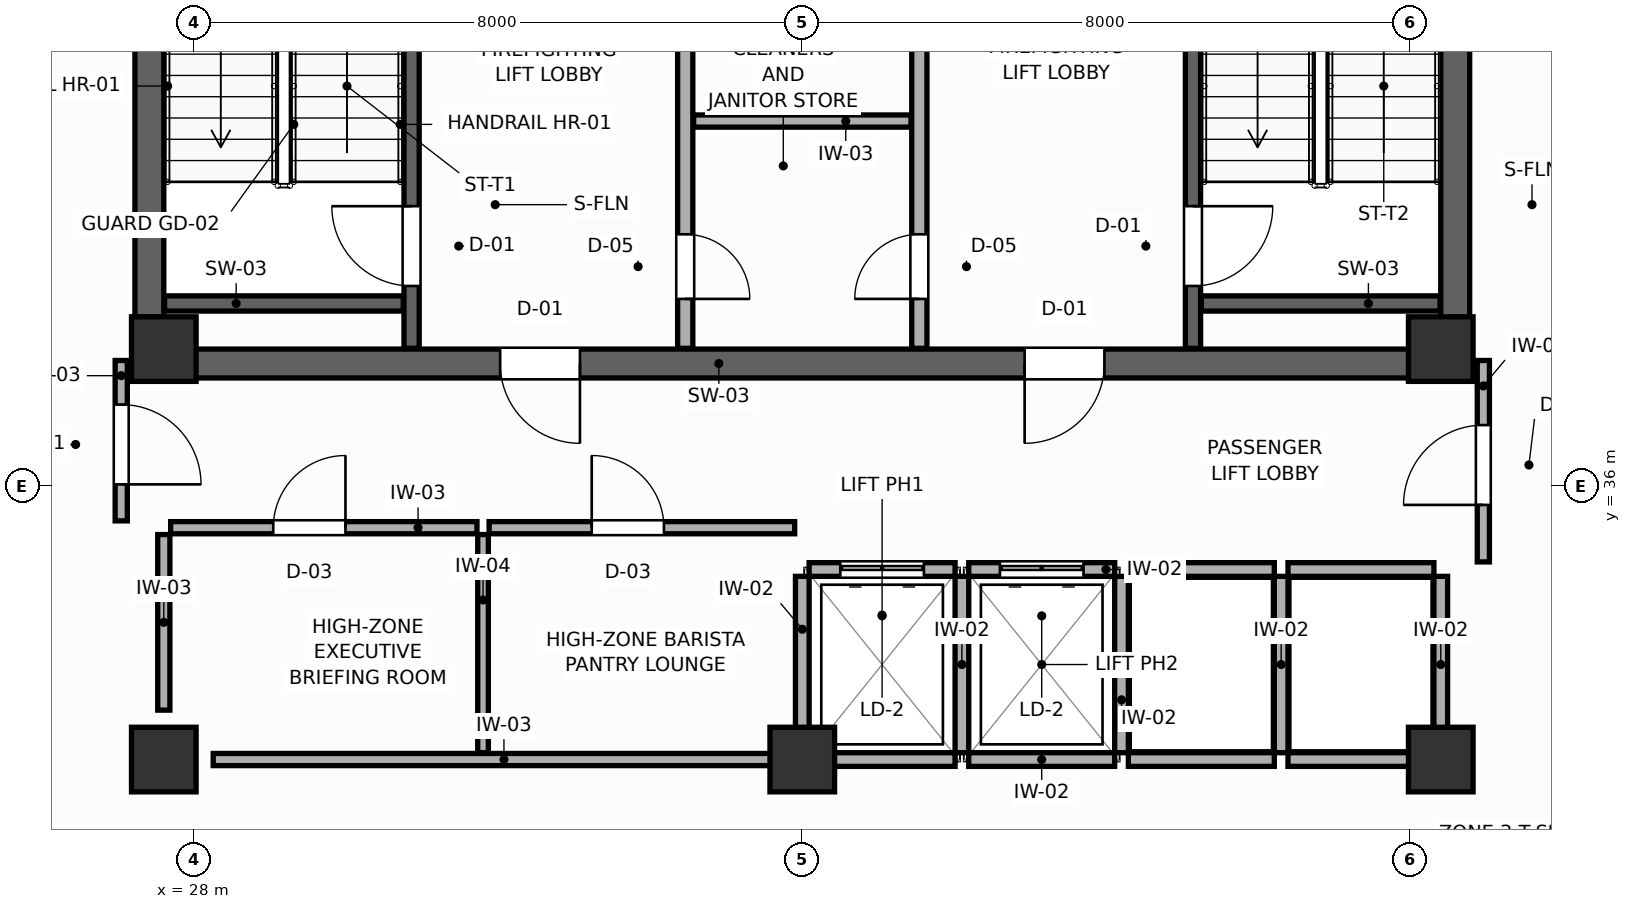
"""IFC4 building model, lengths in metres.
Left out: names, types, materials, properties, quantities, classifications, styles, units other than length and angle.
Written with IfcOpenShell. Run it as: python <this file> out.ifc"""

import sys

from ifc_helpers import new_model, si_unit, direction, frame, frame_2d, origin, origin_2d, place, context, subcontext, project, spatial, rectangle, extrude, source, transform, mapped, element, fill, save


model = new_model("IFC4")
c1 = context("Model", 3, precision=1e-05, world=origin(), true_north=direction((0.0, 1.0)))
c2 = subcontext(c1, "Body", "Model", "MODEL_VIEW")
j1 = project(units=[si_unit("LENGTHUNIT", "METRE"), si_unit("PLANEANGLEUNIT", "RADIAN")], contexts=[c1])
p1 = place(None, origin())
s1 = spatial("IfcSite", under=j1, at=p1, CompositionType="ELEMENT")
p2 = place(p1, origin())
s2 = spatial("IfcBuilding", under=s1, at=p2, CompositionType="ELEMENT")
p3 = place(p2, frame((0.0, 0.0, 271.8)))
s3 = spatial("IfcBuildingStorey", under=s2, at=p3, CompositionType="ELEMENT", Elevation=271.8)
p4 = place(p3, frame((27.22, 37.61, 0.0), z_axis=(0.0, 0.0, 1.0), x_axis=(1.0, 0.0, 0.0)))
e1 = element("IfcWall", 1, at=p4, inside=s3, PredefinedType="SHEAR", context=c2, shape_type="SweptSolid", body=[
    extrude(rectangle(XDim=17.56, YDim=0.38, at=frame_2d((8.78, 0.0))), origin(), (0.0, 0.0, 1.0), 3.6),
])
p5 = place(p4, frame((4.805, 0.0, 0.0)))
e2 = element("IfcOpeningElement", 2, at=p5, cuts=e1, PredefinedType="OPENING", context=c2, shape_type="SweptSolid", body=[
    extrude(rectangle(XDim=1.05, YDim=2.1, at=frame_2d((0.525, 1.05))), frame((0.0, 0.2, 0.0), z_axis=(0.0, -1.0, 0.0), x_axis=(1.0, 0.0, 0.0)), (0.0, 0.0, 1.0), 0.4),
])
p6 = place(p4, frame((11.705, 0.0, 0.0)))
e3 = element("IfcOpeningElement", 3, at=p6, cuts=e1, PredefinedType="OPENING", context=c2, shape_type="SweptSolid", body=[
    extrude(rectangle(XDim=1.05, YDim=2.1, at=frame_2d((0.525, 1.05))), frame((0.0, 0.2, 0.0), z_axis=(0.0, -1.0, 0.0), x_axis=(1.0, 0.0, 0.0)), (0.0, 0.0, 1.0), 0.4),
])
for number, where, z_axis, x_axis in (
    (4, (27.41, 37.8, 0.0), (0.0, 0.0, 1.0), (0.0, 1.0, 0.0)),
    (5, (44.59, 37.8, 0.0), (0.0, 0.0, 1.0), (0.0, 1.0, 0.0)),
):
    element("IfcWall", number, at=place(p3, frame(where, z_axis=z_axis, x_axis=x_axis)), inside=s3, PredefinedType="SHEAR", context=c2, shape_type="SweptSolid", body=[
        extrude(rectangle(XDim=9.0, YDim=0.38, at=frame_2d((4.5, 0.0))), origin(), (0.0, 0.0, 1.0), 3.6),
    ])
m1 = source(origin(), c2, "Body", "SweptSolid", [
    extrude(rectangle(XDim=0.85, YDim=0.85, at=origin_2d()), origin(), (0.0, 0.0, 1.0), 3.6),
])
for number, where, z_axis, x_axis in (
    (6, (27.6, 37.8, 0.0), (0.0, 0.0, 1.0), (1.0, 0.0, 0.0)),
    (7, (44.4, 37.8, 0.0), (0.0, 0.0, 1.0), (1.0, 0.0, 0.0)),
    (8, (27.6, 32.4, 0.0), (0.0, 0.0, 1.0), (1.0, 0.0, 0.0)),
    (9, (44.4, 32.4, 0.0), (0.0, 0.0, 1.0), (1.0, 0.0, 0.0)),
    (10, (36.0, 32.4, 0.0), (0.0, 0.0, 1.0), (1.0, 0.0, 0.0)),
):
    element("IfcColumn", number, at=place(p3, frame(where, z_axis=z_axis, x_axis=x_axis)), inside=s3, PredefinedType="COLUMN", context=c2, shape_type="MappedRepresentation", body=[
        mapped(m1, transform((0.0, 0.0, 0.0), scale=1.0)),
    ])
p7 = place(p3, frame((30.86, 37.81, 0.0), z_axis=(0.0, 0.0, 1.0), x_axis=(0.0, 1.0, 0.0)))
e11 = element("IfcWall", 11, at=p7, inside=s3, PredefinedType="SHEAR", context=c2, shape_type="SweptSolid", body=[
    extrude(rectangle(XDim=8.98, YDim=0.2, at=frame_2d((4.49, 0.0))), origin(), (0.0, 0.0, 1.0), 3.6),
])
p8 = place(p7, frame((0.82, 0.0, 0.0)))
e12 = element("IfcOpeningElement", 12, at=p8, cuts=e11, PredefinedType="OPENING", context=c2, shape_type="SweptSolid", body=[
    extrude(rectangle(XDim=1.05, YDim=2.1, at=frame_2d((0.525, 1.05))), frame((0.0, 0.11, 0.0), z_axis=(0.0, -1.0, 0.0), x_axis=(1.0, 0.0, 0.0)), (0.0, 0.0, 1.0), 0.22),
])
p9 = place(p3, frame((27.61, 38.4, 0.0), z_axis=(0.0, 0.0, 1.0), x_axis=(1.0, 0.0, 0.0)))
e13 = element("IfcWall", 13, at=p9, inside=s3, PredefinedType="SHEAR", context=c2, shape_type="SweptSolid", body=[
    extrude(rectangle(XDim=3.14, YDim=0.2, at=frame_2d((1.57, 0.0))), origin(), (0.0, 0.0, 1.0), 3.6),
])
p10 = place(p3, frame((41.14, 37.81, 0.0), z_axis=(0.0, 0.0, 1.0), x_axis=(0.0, 1.0, 0.0)))
e14 = element("IfcWall", 14, at=p10, inside=s3, PredefinedType="SHEAR", context=c2, shape_type="SweptSolid", body=[
    extrude(rectangle(XDim=8.98, YDim=0.2, at=frame_2d((4.49, 0.0))), origin(), (0.0, 0.0, 1.0), 3.6),
])
p11 = place(p10, frame((0.82, 0.0, 0.0)))
e15 = element("IfcOpeningElement", 15, at=p11, cuts=e14, PredefinedType="OPENING", context=c2, shape_type="SweptSolid", body=[
    extrude(rectangle(XDim=1.05, YDim=2.1, at=frame_2d((0.525, 1.05))), frame((0.0, 0.11, 0.0), z_axis=(0.0, -1.0, 0.0), x_axis=(1.0, 0.0, 0.0)), (0.0, 0.0, 1.0), 0.22),
])
p12 = place(p3, frame((41.25, 38.4, 0.0), z_axis=(0.0, 0.0, 1.0), x_axis=(1.0, 0.0, 0.0)))
e16 = element("IfcWall", 16, at=p12, inside=s3, PredefinedType="SHEAR", context=c2, shape_type="SweptSolid", body=[
    extrude(rectangle(XDim=3.14, YDim=0.2, at=frame_2d((1.57, 0.0))), origin(), (0.0, 0.0, 1.0), 3.6),
])
p13 = place(p3, frame((34.46, 37.81, 0.0), z_axis=(0.0, 0.0, 1.0), x_axis=(0.0, 1.0, 0.0)))
e17 = element("IfcWall", 17, at=p13, inside=s3, PredefinedType="PARTITIONING", context=c2, shape_type="SweptSolid", body=[
    extrude(rectangle(XDim=8.98, YDim=0.2, at=frame_2d((4.49, 0.0))), origin(), (0.0, 0.0, 1.0), 3.18),
])
p14 = place(p13, frame((0.65, 0.0, 0.0)))
e18 = element("IfcOpeningElement", 18, at=p14, cuts=e17, PredefinedType="OPENING", context=c2, shape_type="SweptSolid", body=[
    extrude(rectangle(XDim=0.85, YDim=2.05, at=frame_2d((0.425, 1.025))), frame((0.0, 0.11, 0.0), z_axis=(0.0, -1.0, 0.0), x_axis=(1.0, 0.0, 0.0)), (0.0, 0.0, 1.0), 0.22),
])
p15 = place(p3, frame((37.54, 37.81, 0.0), z_axis=(0.0, 0.0, 1.0), x_axis=(0.0, 1.0, 0.0)))
e19 = element("IfcWall", 19, at=p15, inside=s3, PredefinedType="PARTITIONING", context=c2, shape_type="SweptSolid", body=[
    extrude(rectangle(XDim=8.98, YDim=0.2, at=frame_2d((4.49, 0.0))), origin(), (0.0, 0.0, 1.0), 3.18),
])
p16 = place(p15, frame((0.65, 0.0, 0.0)))
e20 = element("IfcOpeningElement", 20, at=p16, cuts=e19, PredefinedType="OPENING", context=c2, shape_type="SweptSolid", body=[
    extrude(rectangle(XDim=0.85, YDim=2.05, at=frame_2d((0.425, 1.025))), frame((0.0, 0.11, 0.0), z_axis=(0.0, -1.0, 0.0), x_axis=(1.0, 0.0, 0.0)), (0.0, 0.0, 1.0), 0.22),
])
p17 = place(p3, frame((34.57, 40.8, 0.0), z_axis=(0.0, 0.0, 1.0), x_axis=(1.0, 0.0, 0.0)))
e21 = element("IfcWall", 21, at=p17, inside=s3, PredefinedType="PARTITIONING", context=c2, shape_type="SweptSolid", body=[
    extrude(rectangle(XDim=2.86, YDim=0.16, at=frame_2d((1.43, 0.0))), origin(), (0.0, 0.0, 1.0), 3.18),
])
p18 = place(p3, frame((36.09, 34.9, 0.0), z_axis=(0.0, 0.0, 1.0), x_axis=(1.0, 0.0, 0.0)))
e22 = element("IfcWall", 22, at=p18, inside=s3, PredefinedType="PARTITIONING", context=c2, shape_type="SweptSolid", body=[
    extrude(rectangle(XDim=1.92, YDim=0.18, at=frame_2d((0.96, 0.0))), origin(), (0.0, 0.0, 1.0), 3.18),
])
p19 = place(p18, frame((0.41, 0.0, 0.0)))
e23 = element("IfcOpeningElement", 23, at=p19, cuts=e22, PredefinedType="OPENING", context=c2, shape_type="SweptSolid", body=[
    extrude(rectangle(XDim=1.1, YDim=2.1, at=frame_2d((0.55, 1.05))), frame((0.0, 0.1, 0.0), z_axis=(0.0, -1.0, 0.0), x_axis=(1.0, 0.0, 0.0)), (0.0, 0.0, 1.0), 0.2),
])
p20 = place(p3, frame((36.09, 32.4, 0.0), z_axis=(0.0, 0.0, 1.0), x_axis=(1.0, 0.0, 0.0)))
e24 = element("IfcWall", 24, at=p20, inside=s3, PredefinedType="PARTITIONING", context=c2, shape_type="SweptSolid", body=[
    extrude(rectangle(XDim=1.92, YDim=0.18, at=frame_2d((0.96, 0.0))), origin(), (0.0, 0.0, 1.0), 2.04),
])
p21 = place(p3, frame((36.0, 32.49, 0.0), z_axis=(0.0, 0.0, 1.0), x_axis=(0.0, 1.0, 0.0)))
e25 = element("IfcWall", 25, at=p21, inside=s3, PredefinedType="PARTITIONING", context=c2, shape_type="SweptSolid", body=[
    extrude(rectangle(XDim=2.32, YDim=0.18, at=frame_2d((1.16, 0.0))), origin(), (0.0, 0.0, 1.0), 3.18),
])
p22 = place(p3, frame((38.19, 34.9, 0.0), z_axis=(0.0, 0.0, 1.0), x_axis=(1.0, 0.0, 0.0)))
e26 = element("IfcWall", 26, at=p22, inside=s3, PredefinedType="PARTITIONING", context=c2, shape_type="SweptSolid", body=[
    extrude(rectangle(XDim=1.92, YDim=0.18, at=frame_2d((0.96, 0.0))), origin(), (0.0, 0.0, 1.0), 3.18),
])
p23 = place(p22, frame((0.41, 0.0, 0.0)))
e27 = element("IfcOpeningElement", 27, at=p23, cuts=e26, PredefinedType="OPENING", context=c2, shape_type="SweptSolid", body=[
    extrude(rectangle(XDim=1.1, YDim=2.1, at=frame_2d((0.55, 1.05))), frame((0.0, 0.1, 0.0), z_axis=(0.0, -1.0, 0.0), x_axis=(1.0, 0.0, 0.0)), (0.0, 0.0, 1.0), 0.2),
])
p24 = place(p3, frame((38.19, 32.4, 0.0), z_axis=(0.0, 0.0, 1.0), x_axis=(1.0, 0.0, 0.0)))
e28 = element("IfcWall", 28, at=p24, inside=s3, PredefinedType="PARTITIONING", context=c2, shape_type="SweptSolid", body=[
    extrude(rectangle(XDim=1.92, YDim=0.18, at=frame_2d((0.96, 0.0))), origin(), (0.0, 0.0, 1.0), 2.04),
])
p25 = place(p3, frame((38.1, 32.49, 0.0), z_axis=(0.0, 0.0, 1.0), x_axis=(0.0, 1.0, 0.0)))
e29 = element("IfcWall", 29, at=p25, inside=s3, PredefinedType="PARTITIONING", context=c2, shape_type="SweptSolid", body=[
    extrude(rectangle(XDim=2.32, YDim=0.18, at=frame_2d((1.16, 0.0))), origin(), (0.0, 0.0, 1.0), 3.18),
])
p26 = place(p3, frame((40.29, 34.9, 0.0), z_axis=(0.0, 0.0, 1.0), x_axis=(1.0, 0.0, 0.0)))
e30 = element("IfcWall", 30, at=p26, inside=s3, PredefinedType="PARTITIONING", context=c2, shape_type="SweptSolid", body=[
    extrude(rectangle(XDim=1.92, YDim=0.18, at=frame_2d((0.96, 0.0))), origin(), (0.0, 0.0, 1.0), 3.18),
])
p27 = place(p3, frame((40.29, 32.4, 0.0), z_axis=(0.0, 0.0, 1.0), x_axis=(1.0, 0.0, 0.0)))
e31 = element("IfcWall", 31, at=p27, inside=s3, PredefinedType="PARTITIONING", context=c2, shape_type="SweptSolid", body=[
    extrude(rectangle(XDim=1.92, YDim=0.18, at=frame_2d((0.96, 0.0))), origin(), (0.0, 0.0, 1.0), 2.04),
])
p28 = place(p3, frame((40.2, 32.49, 0.0), z_axis=(0.0, 0.0, 1.0), x_axis=(0.0, 1.0, 0.0)))
e32 = element("IfcWall", 32, at=p28, inside=s3, PredefinedType="PARTITIONING", context=c2, shape_type="SweptSolid", body=[
    extrude(rectangle(XDim=2.32, YDim=0.18, at=frame_2d((1.16, 0.0))), origin(), (0.0, 0.0, 1.0), 3.18),
])
p29 = place(p3, frame((42.39, 34.9, 0.0), z_axis=(0.0, 0.0, 1.0), x_axis=(1.0, 0.0, 0.0)))
e33 = element("IfcWall", 33, at=p29, inside=s3, PredefinedType="PARTITIONING", context=c2, shape_type="SweptSolid", body=[
    extrude(rectangle(XDim=1.92, YDim=0.18, at=frame_2d((0.96, 0.0))), origin(), (0.0, 0.0, 1.0), 3.18),
])
p30 = place(p3, frame((42.39, 32.4, 0.0), z_axis=(0.0, 0.0, 1.0), x_axis=(1.0, 0.0, 0.0)))
e34 = element("IfcWall", 34, at=p30, inside=s3, PredefinedType="PARTITIONING", context=c2, shape_type="SweptSolid", body=[
    extrude(rectangle(XDim=1.92, YDim=0.18, at=frame_2d((0.96, 0.0))), origin(), (0.0, 0.0, 1.0), 2.04),
])
for number, where, z_axis, x_axis in (
    (35, (42.3, 32.49, 0.0), (0.0, 0.0, 1.0), (0.0, 1.0, 0.0)),
    (36, (44.4, 32.49, 0.0), (0.0, 0.0, 1.0), (0.0, 1.0, 0.0)),
):
    element("IfcWall", number, at=place(p3, frame(where, z_axis=z_axis, x_axis=x_axis)), inside=s3, PredefinedType="PARTITIONING", context=c2, shape_type="SweptSolid", body=[
        extrude(rectangle(XDim=2.32, YDim=0.18, at=frame_2d((1.16, 0.0))), origin(), (0.0, 0.0, 1.0), 3.18),
    ])
p31 = place(p3, frame((28.25, 32.4, 0.0), z_axis=(0.0, 0.0, 1.0), x_axis=(1.0, 0.0, 0.0)))
e37 = element("IfcWall", 37, at=p31, inside=s3, PredefinedType="PARTITIONING", context=c2, shape_type="SweptSolid", body=[
    extrude(rectangle(XDim=7.65, YDim=0.16, at=frame_2d((3.825, 0.0))), origin(), (0.0, 0.0, 1.0), 2.04),
])
p32 = place(p3, frame((27.6, 33.05, 0.0), z_axis=(0.0, 0.0, 1.0), x_axis=(0.0, 1.0, 0.0)))
e38 = element("IfcWall", 38, at=p32, inside=s3, PredefinedType="PARTITIONING", context=c2, shape_type="SweptSolid", body=[
    extrude(rectangle(XDim=2.31, YDim=0.16, at=frame_2d((1.155, 0.0))), origin(), (0.0, 0.0, 1.0), 3.18),
])
p33 = place(p3, frame((31.8, 32.49, 0.0), z_axis=(0.0, 0.0, 1.0), x_axis=(0.0, 1.0, 0.0)))
e39 = element("IfcWall", 39, at=p33, inside=s3, PredefinedType="PARTITIONING", context=c2, shape_type="SweptSolid", body=[
    extrude(rectangle(XDim=2.87, YDim=0.14, at=frame_2d((1.435, 0.0))), origin(), (0.0, 0.0, 1.0), 3.18),
])
p34 = place(p3, frame((27.69, 35.45, 0.0), z_axis=(0.0, 0.0, 1.0), x_axis=(1.0, 0.0, 0.0)))
e40 = element("IfcWall", 40, at=p34, inside=s3, PredefinedType="PARTITIONING", context=c2, shape_type="SweptSolid", body=[
    extrude(rectangle(XDim=4.03, YDim=0.16, at=frame_2d((2.015, 0.0))), origin(), (0.0, 0.0, 1.0), 3.18),
])
p35 = place(p34, frame((1.35, 0.0, 0.0)))
e41 = element("IfcOpeningElement", 41, at=p35, cuts=e40, PredefinedType="OPENING", context=c2, shape_type="SweptSolid", body=[
    extrude(rectangle(XDim=0.95, YDim=2.05, at=frame_2d((0.475, 1.025))), frame((0.0, 0.09, 0.0), z_axis=(0.0, -1.0, 0.0), x_axis=(1.0, 0.0, 0.0)), (0.0, 0.0, 1.0), 0.18),
])
p36 = place(p3, frame((31.88, 35.45, 0.0), z_axis=(0.0, 0.0, 1.0), x_axis=(1.0, 0.0, 0.0)))
e42 = element("IfcWall", 42, at=p36, inside=s3, PredefinedType="PARTITIONING", context=c2, shape_type="SweptSolid", body=[
    extrude(rectangle(XDim=4.02, YDim=0.16, at=frame_2d((2.01, 0.0))), origin(), (0.0, 0.0, 1.0), 3.18),
])
p37 = place(p36, frame((1.35, 0.0, 0.0)))
e43 = element("IfcOpeningElement", 43, at=p37, cuts=e42, PredefinedType="OPENING", context=c2, shape_type="SweptSolid", body=[
    extrude(rectangle(XDim=0.95, YDim=2.05, at=frame_2d((0.475, 1.025))), frame((0.0, 0.09, 0.0), z_axis=(0.0, -1.0, 0.0), x_axis=(1.0, 0.0, 0.0)), (0.0, 0.0, 1.0), 0.18),
])
p38 = place(p3, frame((27.04, 35.54, 0.0), z_axis=(0.0, 0.0, 1.0), x_axis=(0.0, 1.0, 0.0)))
e44 = element("IfcWall", 44, at=p38, inside=s3, PredefinedType="PARTITIONING", context=c2, shape_type="SweptSolid", body=[
    extrude(rectangle(XDim=2.11, YDim=0.16, at=frame_2d((1.055, 0.0))), origin(), (0.0, 0.0, 1.0), 3.18),
])
p39 = place(p38, frame((0.48, 0.0, 0.0)))
e45 = element("IfcOpeningElement", 45, at=p39, cuts=e44, PredefinedType="OPENING", context=c2, shape_type="SweptSolid", body=[
    extrude(rectangle(XDim=1.05, YDim=2.1, at=frame_2d((0.525, 1.05))), frame((0.0, 0.09, 0.0), z_axis=(0.0, -1.0, 0.0), x_axis=(1.0, 0.0, 0.0)), (0.0, 0.0, 1.0), 0.18),
])
p40 = place(p3, frame((44.96, 35.0, 0.0), z_axis=(0.0, 0.0, 1.0), x_axis=(0.0, 1.0, 0.0)))
e46 = element("IfcWall", 46, at=p40, inside=s3, PredefinedType="PARTITIONING", context=c2, shape_type="SweptSolid", body=[
    extrude(rectangle(XDim=2.65, YDim=0.16, at=frame_2d((1.325, 0.0))), origin(), (0.0, 0.0, 1.0), 3.18),
])
p41 = place(p40, frame((0.75, 0.0, 0.0)))
e47 = element("IfcOpeningElement", 47, at=p41, cuts=e46, PredefinedType="OPENING", context=c2, shape_type="SweptSolid", body=[
    extrude(rectangle(XDim=1.05, YDim=2.1, at=frame_2d((0.525, 1.05))), frame((0.0, 0.09, 0.0), z_axis=(0.0, -1.0, 0.0), x_axis=(1.0, 0.0, 0.0)), (0.0, 0.0, 1.0), 0.18),
])
p42 = place(p8, origin())
e48 = element("IfcDoor", 48, at=p42, inside=s3, OperationType="SINGLE_SWING_RIGHT", PredefinedType="DOOR", context=c2, shape_type="SweptSolid", body=[
    extrude(rectangle(XDim=1.05, YDim=2.1, at=frame_2d((0.525, 1.05))), frame((0.0, 0.025, 0.0), z_axis=(0.0, -1.0, 0.0), x_axis=(1.0, 0.0, 0.0)), (0.0, 0.0, 1.0), 0.05),
])
fill(e12, e48)
p43 = place(p11, frame((1.05, 0.0, 0.0), z_axis=(0.0, 0.0, 1.0), x_axis=(-1.0, 0.0, 0.0)))
e49 = element("IfcDoor", 49, at=p43, inside=s3, OperationType="SINGLE_SWING_LEFT", PredefinedType="DOOR", context=c2, shape_type="SweptSolid", body=[
    extrude(rectangle(XDim=1.05, YDim=2.1, at=frame_2d((0.525, 1.05))), frame((0.0, 0.025, 0.0), z_axis=(0.0, -1.0, 0.0), x_axis=(1.0, 0.0, 0.0)), (0.0, 0.0, 1.0), 0.05),
])
fill(e15, e49)
p44 = place(p14, frame((0.85, 0.0, 0.0), z_axis=(0.0, 0.0, 1.0), x_axis=(-1.0, 0.0, 0.0)))
e50 = element("IfcDoor", 50, at=p44, inside=s3, OperationType="SINGLE_SWING_RIGHT", PredefinedType="DOOR", context=c2, shape_type="SweptSolid", body=[
    extrude(rectangle(XDim=0.85, YDim=2.05, at=frame_2d((0.425, 1.025))), frame((0.0, 0.025, 0.0), z_axis=(0.0, -1.0, 0.0), x_axis=(1.0, 0.0, 0.0)), (0.0, 0.0, 1.0), 0.05),
])
fill(e18, e50)
p45 = place(p16, origin())
e51 = element("IfcDoor", 51, at=p45, inside=s3, OperationType="SINGLE_SWING_LEFT", PredefinedType="DOOR", context=c2, shape_type="SweptSolid", body=[
    extrude(rectangle(XDim=0.85, YDim=2.05, at=frame_2d((0.425, 1.025))), frame((0.0, 0.025, 0.0), z_axis=(0.0, -1.0, 0.0), x_axis=(1.0, 0.0, 0.0)), (0.0, 0.0, 1.0), 0.05),
])
fill(e20, e51)
p46 = place(p19, origin())
e52 = element("IfcDoor", 52, at=p46, inside=s3, OperationType="DOUBLE_DOOR_SLIDING", PredefinedType="DOOR", context=c2, shape_type="SweptSolid", body=[
    extrude(rectangle(XDim=1.1, YDim=2.1, at=frame_2d((0.55, 1.05))), frame((0.0, 0.025, 0.0), z_axis=(0.0, -1.0, 0.0), x_axis=(1.0, 0.0, 0.0)), (0.0, 0.0, 1.0), 0.05),
])
fill(e23, e52)
p47 = place(p23, origin())
e53 = element("IfcDoor", 53, at=p47, inside=s3, OperationType="DOUBLE_DOOR_SLIDING", PredefinedType="DOOR", context=c2, shape_type="SweptSolid", body=[
    extrude(rectangle(XDim=1.1, YDim=2.1, at=frame_2d((0.55, 1.05))), frame((0.0, 0.025, 0.0), z_axis=(0.0, -1.0, 0.0), x_axis=(1.0, 0.0, 0.0)), (0.0, 0.0, 1.0), 0.05),
])
fill(e27, e53)
p48 = place(p35, origin())
e54 = element("IfcDoor", 54, at=p48, inside=s3, OperationType="SINGLE_SWING_RIGHT", PredefinedType="DOOR", context=c2, shape_type="SweptSolid", body=[
    extrude(rectangle(XDim=0.95, YDim=2.05, at=frame_2d((0.475, 1.025))), frame((0.0, 0.025, 0.0), z_axis=(0.0, -1.0, 0.0), x_axis=(1.0, 0.0, 0.0)), (0.0, 0.0, 1.0), 0.05),
])
fill(e41, e54)
p49 = place(p37, origin())
e55 = element("IfcDoor", 55, at=p49, inside=s3, OperationType="SINGLE_SWING_LEFT", PredefinedType="DOOR", context=c2, shape_type="SweptSolid", body=[
    extrude(rectangle(XDim=0.95, YDim=2.05, at=frame_2d((0.475, 1.025))), frame((0.0, 0.025, 0.0), z_axis=(0.0, -1.0, 0.0), x_axis=(1.0, 0.0, 0.0)), (0.0, 0.0, 1.0), 0.05),
])
fill(e43, e55)
p50 = place(p39, frame((1.05, 0.0, 0.0), z_axis=(0.0, 0.0, 1.0), x_axis=(-1.0, 0.0, 0.0)))
e56 = element("IfcDoor", 56, at=p50, inside=s3, OperationType="SINGLE_SWING_RIGHT", PredefinedType="DOOR", context=c2, shape_type="SweptSolid", body=[
    extrude(rectangle(XDim=1.05, YDim=2.1, at=frame_2d((0.525, 1.05))), frame((0.0, 0.025, 0.0), z_axis=(0.0, -1.0, 0.0), x_axis=(1.0, 0.0, 0.0)), (0.0, 0.0, 1.0), 0.05),
])
fill(e45, e56)
p51 = place(p41, origin())
e57 = element("IfcDoor", 57, at=p51, inside=s3, OperationType="SINGLE_SWING_LEFT", PredefinedType="DOOR", context=c2, shape_type="SweptSolid", body=[
    extrude(rectangle(XDim=1.05, YDim=2.1, at=frame_2d((0.525, 1.05))), frame((0.0, 0.025, 0.0), z_axis=(0.0, -1.0, 0.0), x_axis=(1.0, 0.0, 0.0)), (0.0, 0.0, 1.0), 0.05),
])
fill(e47, e57)
p52 = place(p5, frame((1.05, 0.0, 0.0), z_axis=(0.0, 0.0, 1.0), x_axis=(-1.0, 0.0, 0.0)))
e58 = element("IfcDoor", 58, at=p52, inside=s3, OperationType="SINGLE_SWING_LEFT", PredefinedType="DOOR", context=c2, shape_type="SweptSolid", body=[
    extrude(rectangle(XDim=1.05, YDim=2.1, at=frame_2d((0.525, 1.05))), frame((0.0, 0.025, 0.0), z_axis=(0.0, -1.0, 0.0), x_axis=(1.0, 0.0, 0.0)), (0.0, 0.0, 1.0), 0.05),
])
fill(e2, e58)
p53 = place(p6, frame((1.05, 0.0, 0.0), z_axis=(0.0, 0.0, 1.0), x_axis=(-1.0, 0.0, 0.0)))
e59 = element("IfcDoor", 59, at=p53, inside=s3, OperationType="SINGLE_SWING_RIGHT", PredefinedType="DOOR", context=c2, shape_type="SweptSolid", body=[
    extrude(rectangle(XDim=1.05, YDim=2.1, at=frame_2d((0.525, 1.05))), frame((0.0, 0.025, 0.0), z_axis=(0.0, -1.0, 0.0), x_axis=(1.0, 0.0, 0.0)), (0.0, 0.0, 1.0), 0.05),
])
fill(e3, e59)
save(model, sys.argv[1])
